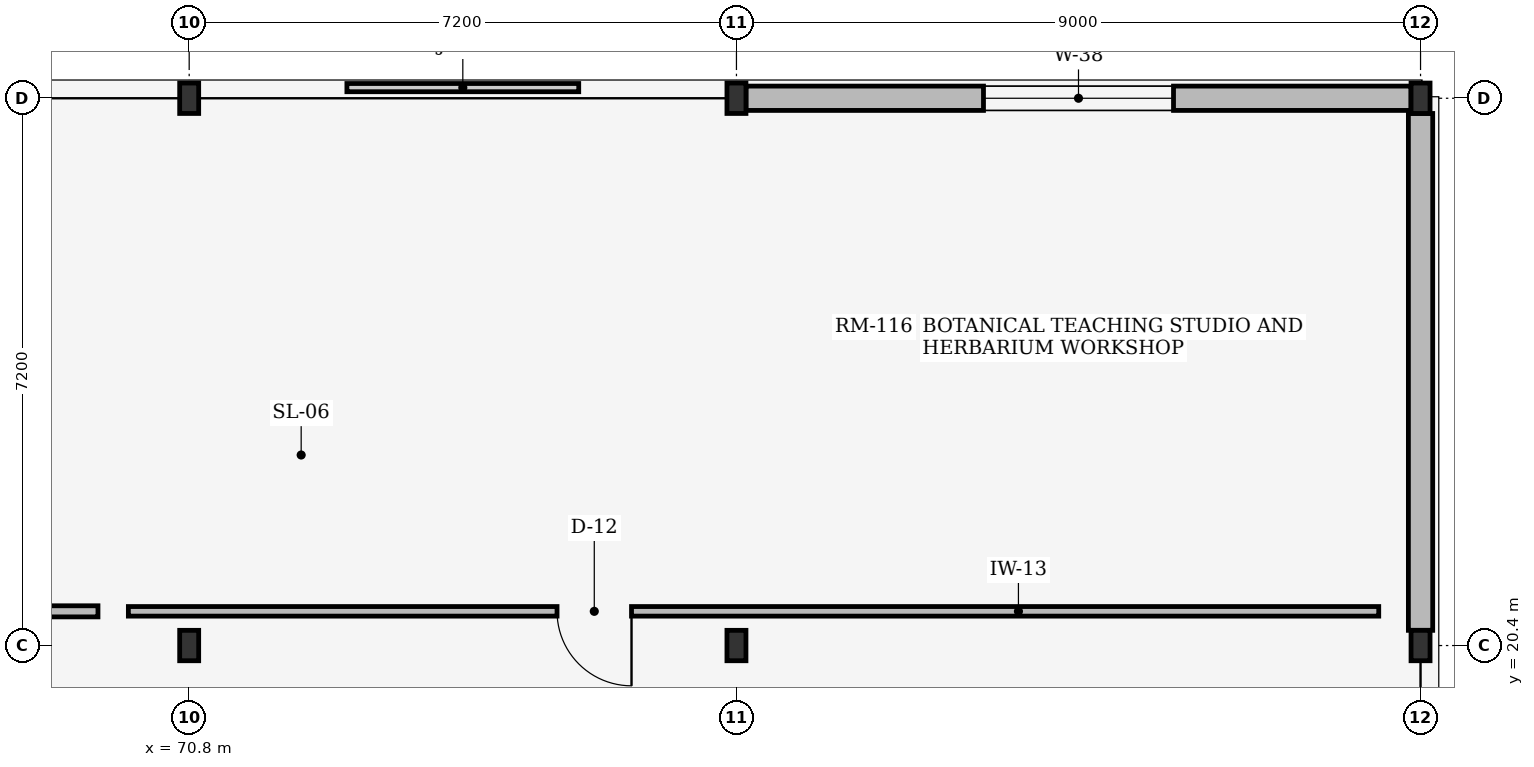
"""IFC4 building model, lengths in metres.
Left out: names, types, materials, properties, quantities, classifications, styles, units other than length and angle.
Written with IfcOpenShell. Run it as: python <this file> out.ifc"""

import sys

from ifc_helpers import new_model, si_unit, direction, frame, frame_2d, origin, origin_2d, place, context, subcontext, project, spatial, rectangle, i_section, extrude, element, fill, save


model = new_model("IFC4")
c1 = context("Model", 3, precision=1e-05, world=origin(), true_north=direction((0.0, 1.0)))
c2 = subcontext(c1, "Body", "Model", "MODEL_VIEW")
j1 = project(units=[si_unit("LENGTHUNIT", "METRE"), si_unit("PLANEANGLEUNIT", "RADIAN")], contexts=[c1])
p1 = place(None, origin())
s1 = spatial("IfcSite", under=j1, at=p1, CompositionType="ELEMENT")
p2 = place(p1, origin())
s2 = spatial("IfcBuilding", under=s1, at=p2, CompositionType="ELEMENT")
p3 = place(p2, frame((0.0, 0.0, 9.0)))
s3 = spatial("IfcBuildingStorey", under=s2, at=p3, CompositionType="ELEMENT", Elevation=9.0)
for number, where, z_axis, x_axis in (
    (1, (70.8, 20.4, 0.0), (0.0, 0.0, 1.0), (1.0, 0.0, 0.0)),
    (2, (70.8, 27.6, 0.0), (0.0, 0.0, 1.0), (1.0, 0.0, 0.0)),
    (3, (78.0, 20.4, 0.0), (0.0, 0.0, 1.0), (1.0, 0.0, 0.0)),
    (4, (78.0, 27.6, 0.0), (0.0, 0.0, 1.0), (1.0, 0.0, 0.0)),
    (5, (87.0, 20.4, 0.0), (0.0, 0.0, 1.0), (1.0, 0.0, 0.0)),
    (6, (87.0, 27.6, 0.0), (0.0, 0.0, 1.0), (1.0, 0.0, 0.0)),
):
    element("IfcColumn", number, at=place(p3, frame(where, z_axis=z_axis, x_axis=x_axis)), inside=s3, PredefinedType="COLUMN", context=c2, shape_type="SweptSolid", body=[
        extrude(i_section(OverallWidth=0.25, OverallDepth=0.4, WebThickness=0.01, FlangeThickness=0.013, at=origin_2d()), origin(), (0.0, 0.0, 1.0), 3.96),
    ])
p4 = place(p3, frame((78.125, 27.6, 0.0), z_axis=(0.0, 0.0, 1.0), x_axis=(1.0, 0.0, 0.0)))
e7 = element("IfcWall", 7, at=p4, inside=s3, PredefinedType="STANDARD", context=c2, shape_type="SweptSolid", body=[
    extrude(rectangle(XDim=8.75, YDim=0.32, at=frame_2d((4.375, 0.0))), origin(), (0.0, 0.0, 1.0), 3.42),
])
p5 = place(p4, frame((3.125, 0.0, 0.75)))
e8 = element("IfcOpeningElement", 8, at=p5, cuts=e7, PredefinedType="OPENING", context=c2, shape_type="SweptSolid", body=[
    extrude(rectangle(XDim=2.5, YDim=1.35, at=frame_2d((1.25, 0.675))), frame((0.0, 0.17, 0.0), z_axis=(0.0, -1.0, 0.0), x_axis=(1.0, 0.0, 0.0)), (0.0, 0.0, 1.0), 0.34),
])
p6 = place(p3, frame((87.0, 20.6, 0.0), z_axis=(0.0, 0.0, 1.0), x_axis=(0.0, 1.0, 0.0)))
e9 = element("IfcWall", 9, at=p6, inside=s3, PredefinedType="STANDARD", context=c2, shape_type="SweptSolid", body=[
    extrude(rectangle(XDim=6.8, YDim=0.32, at=frame_2d((3.4, 0.0))), origin(), (0.0, 0.0, 1.0), 3.42),
])
p7 = place(p3, frame((70.0, 20.85, 0.0), z_axis=(0.0, 0.0, 1.0), x_axis=(1.0, 0.0, 0.0)))
e10 = element("IfcWall", 10, at=p7, inside=s3, PredefinedType="PARTITIONING", context=c2, shape_type="SweptSolid", body=[
    extrude(rectangle(XDim=16.45, YDim=0.126, at=frame_2d((8.225, 0.0))), origin(), (0.0, 0.0, 1.0), 3.94),
])
p8 = place(p7, frame((5.639, 0.0, 0.0)))
e11 = element("IfcOpeningElement", 11, at=p8, cuts=e10, PredefinedType="OPENING", context=c2, shape_type="SweptSolid", body=[
    extrude(rectangle(XDim=0.98, YDim=2.1, at=frame_2d((0.49, 1.05))), frame((0.0, 0.073, 0.0), z_axis=(0.0, -1.0, 0.0), x_axis=(1.0, 0.0, 0.0)), (0.0, 0.0, 1.0), 0.146),
])
p9 = place(p3, frame((60.8, 20.85, 0.0), z_axis=(0.0, 0.0, 1.0), x_axis=(1.0, 0.0, 0.0)))
e12 = element("IfcWall", 12, at=p9, inside=s3, PredefinedType="PARTITIONING", context=c2, shape_type="SweptSolid", body=[
    extrude(rectangle(XDim=8.8, YDim=0.146, at=frame_2d((4.4, 0.0))), origin(), (0.0, 0.0, 1.0), 3.94),
])
p10 = place(p9, frame((3.81, 0.0, 0.0)))
e13 = element("IfcOpeningElement", 13, at=p10, cuts=e12, PredefinedType="OPENING", context=c2, shape_type="SweptSolid", body=[
    extrude(rectangle(XDim=1.18, YDim=2.1, at=frame_2d((0.59, 1.05))), frame((0.0, 0.083, 0.0), z_axis=(0.0, -1.0, 0.0), x_axis=(1.0, 0.0, 0.0)), (0.0, 0.0, 1.0), 0.166),
])
p11 = place(p5, origin())
e14 = element("IfcWindow", 14, at=p11, inside=s3, PartitioningType="SINGLE_PANEL", PredefinedType="WINDOW", context=c2, shape_type="SweptSolid", body=[
    extrude(rectangle(XDim=2.5, YDim=1.35, at=frame_2d((1.25, 0.675))), frame((0.0, 0.03, 0.0), z_axis=(0.0, -1.0, 0.0), x_axis=(1.0, 0.0, 0.0)), (0.0, 0.0, 1.0), 0.06),
])
fill(e8, e14)
p12 = place(p8, origin())
e15 = element("IfcDoor", 15, at=p12, inside=s3, OperationType="SINGLE_SWING_RIGHT", PredefinedType="DOOR", context=c2, shape_type="SweptSolid", body=[
    extrude(rectangle(XDim=0.98, YDim=2.1, at=frame_2d((0.49, 1.05))), frame((0.0, 0.025, 0.0), z_axis=(0.0, -1.0, 0.0), x_axis=(1.0, 0.0, 0.0)), (0.0, 0.0, 1.0), 0.05),
])
fill(e11, e15)
save(model, sys.argv[1])
